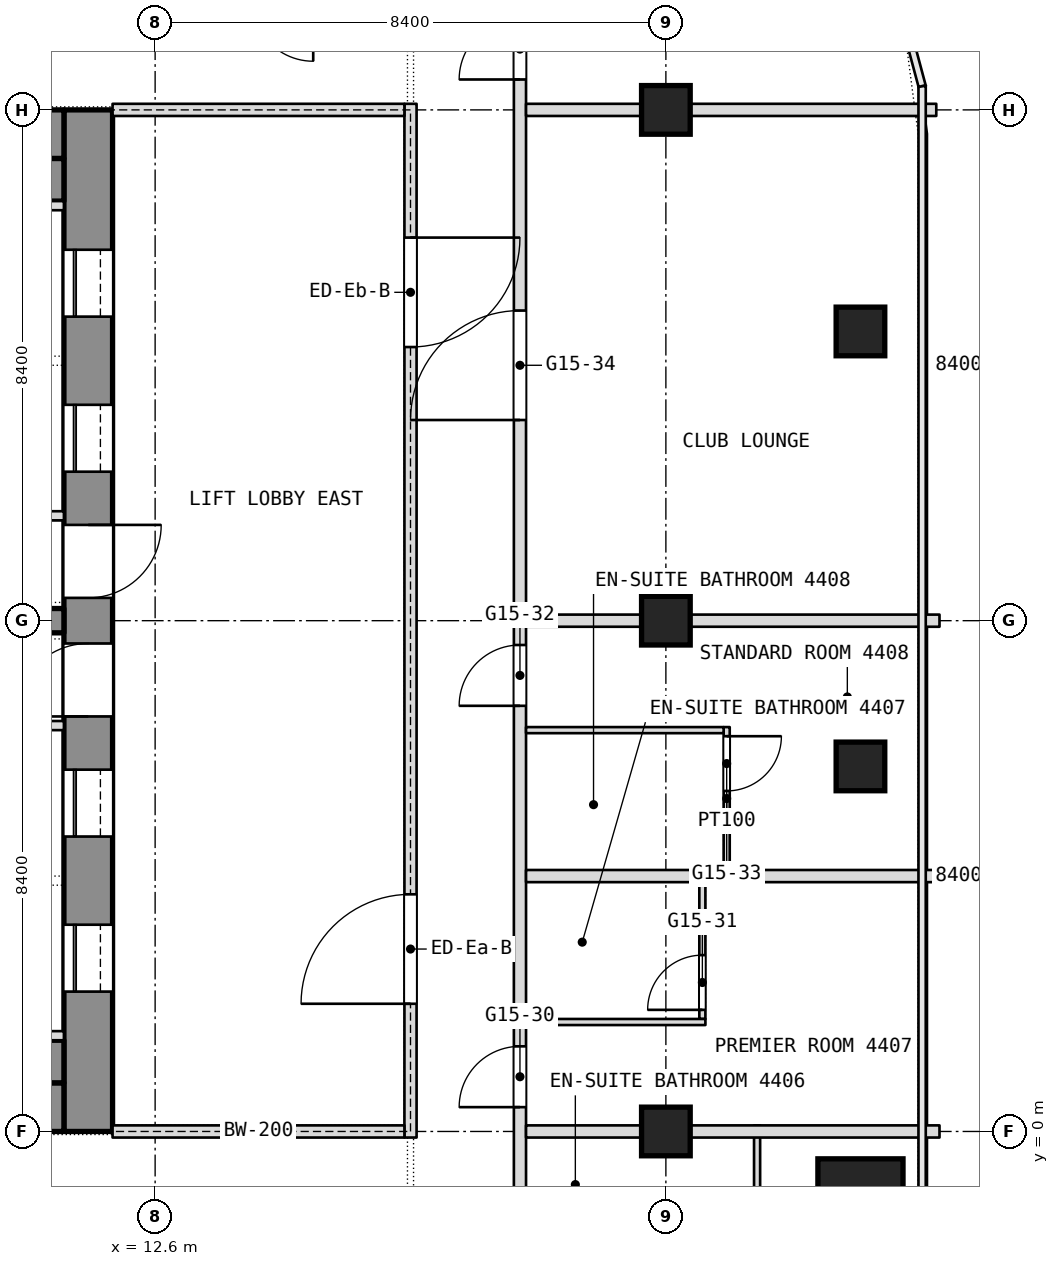
"""IFC4 building model, lengths in metres.
Left out: names, types, materials, properties, quantities, classifications, styles, units other than length and angle.
Written with IfcOpenShell. Run it as: python <this file> out.ifc"""

import sys

from ifc_helpers import new_model, si_unit, direction, frame, frame_2d, origin, origin_2d, place, context, subcontext, project, spatial, rectangle, extrude, element, fill, save


model = new_model("IFC4")
c1 = context("Model", 3, precision=1e-05, world=origin(), true_north=direction((0.0, 1.0)))
c2 = subcontext(c1, "Body", "Model", "MODEL_VIEW")
j1 = project(units=[si_unit("LENGTHUNIT", "METRE"), si_unit("PLANEANGLEUNIT", "RADIAN")], contexts=[c1])
p1 = place(None, origin())
s1 = spatial("IfcSite", under=j1, at=p1, CompositionType="ELEMENT")
p2 = place(p1, origin())
s2 = spatial("IfcBuilding", under=s1, at=p2, CompositionType="ELEMENT")
p3 = place(p2, frame((0.0, 0.0, 194.9)))
s3 = spatial("IfcBuildingStorey", under=s2, at=p3, CompositionType="ELEMENT", Elevation=194.9)
p4 = place(p3, frame((11.5, 0.0, 0.0), z_axis=(0.0, 0.0, 1.0), x_axis=(0.0, 1.0, 0.0)))
e1 = element("IfcWall", 1, at=p4, inside=s3, PredefinedType="SHEAR", context=c2, shape_type="SweptSolid", body=[
    extrude(rectangle(XDim=16.8, YDim=0.8, at=frame_2d((8.4, 0.0))), origin(), (0.0, 0.0, 1.0), 3.6),
])
p5 = place(p4, frame((2.3, 0.0, 0.0)))
e2 = element("IfcOpeningElement", 2, at=p5, cuts=e1, PredefinedType="OPENING", context=c2, shape_type="SweptSolid", body=[
    extrude(rectangle(XDim=1.1, YDim=2.1, at=frame_2d((0.55, 1.05))), frame((0.0, 0.4, 0.0), z_axis=(0.0, -1.0, 0.0), x_axis=(1.0, 0.0, 0.0)), (0.0, 0.0, 1.0), 0.8),
])
p6 = place(p4, frame((4.85, 0.0, 0.0)))
e3 = element("IfcOpeningElement", 3, at=p6, cuts=e1, PredefinedType="OPENING", context=c2, shape_type="SweptSolid", body=[
    extrude(rectangle(XDim=1.1, YDim=2.1, at=frame_2d((0.55, 1.05))), frame((0.0, 0.4, 0.0), z_axis=(0.0, -1.0, 0.0), x_axis=(1.0, 0.0, 0.0)), (0.0, 0.0, 1.0), 0.8),
])
p7 = place(p4, frame((6.825, 0.0, 0.0)))
e4 = element("IfcOpeningElement", 4, at=p7, cuts=e1, PredefinedType="OPENING", context=c2, shape_type="SweptSolid", body=[
    extrude(rectangle(XDim=1.2, YDim=2.1, at=frame_2d((0.6, 1.05))), frame((0.0, 0.4, 0.0), z_axis=(0.0, -1.0, 0.0), x_axis=(1.0, 0.0, 0.0)), (0.0, 0.0, 1.0), 0.8),
])
p8 = place(p4, frame((13.4, 0.0, 0.0)))
e5 = element("IfcOpeningElement", 5, at=p8, cuts=e1, PredefinedType="OPENING", context=c2, shape_type="SweptSolid", body=[
    extrude(rectangle(XDim=1.1, YDim=2.1, at=frame_2d((0.55, 1.05))), frame((0.0, 0.4, 0.0), z_axis=(0.0, -1.0, 0.0), x_axis=(1.0, 0.0, 0.0)), (0.0, 0.0, 1.0), 0.8),
])
p9 = place(p4, frame((10.85, 0.0, 0.0)))
e6 = element("IfcOpeningElement", 6, at=p9, cuts=e1, PredefinedType="OPENING", context=c2, shape_type="SweptSolid", body=[
    extrude(rectangle(XDim=1.1, YDim=2.1, at=frame_2d((0.55, 1.05))), frame((0.0, 0.4, 0.0), z_axis=(0.0, -1.0, 0.0), x_axis=(1.0, 0.0, 0.0)), (0.0, 0.0, 1.0), 0.8),
])
p10 = place(p4, frame((8.775, 0.0, 0.0)))
e7 = element("IfcOpeningElement", 7, at=p10, cuts=e1, PredefinedType="OPENING", context=c2, shape_type="SweptSolid", body=[
    extrude(rectangle(XDim=1.2, YDim=2.1, at=frame_2d((0.6, 1.05))), frame((0.0, 0.4, 0.0), z_axis=(0.0, -1.0, 0.0), x_axis=(1.0, 0.0, 0.0)), (0.0, 0.0, 1.0), 0.8),
])
for number, where, z_axis, x_axis in (
    (8, (-11.1, 0.4, 0.0), (0.0, 0.0, 1.0), (1.0, 0.0, 0.0)),
    (9, (-11.1, 16.4, 0.0), (0.0, 0.0, 1.0), (1.0, 0.0, 0.0)),
):
    element("IfcWall", number, at=place(p3, frame(where, z_axis=z_axis, x_axis=x_axis)), inside=s3, PredefinedType="SHEAR", context=c2, shape_type="SweptSolid", body=[
        extrude(rectangle(XDim=22.2, YDim=0.8, at=frame_2d((11.1, 0.0))), origin(), (0.0, 0.0, 1.0), 3.6),
    ])
p11 = place(p3, frame((4.4, 8.4, 0.0), z_axis=(0.0, 0.0, 1.0), x_axis=(1.0, 0.0, 0.0)))
e10 = element("IfcWall", 10, at=p11, inside=s3, PredefinedType="SHEAR", context=c2, shape_type="SweptSolid", body=[
    extrude(rectangle(XDim=6.7, YDim=0.4, at=frame_2d((3.35, 0.0))), origin(), (0.0, 0.0, 1.0), 3.6),
])
p12 = place(p3, frame((24.2, -1.15, 0.0), z_axis=(0.0, 0.0, 1.0), x_axis=(1.0, 0.0, 0.0)))
e11 = element("IfcColumn", 11, at=p12, inside=s3, PredefinedType="COLUMN", context=c2, shape_type="SweptSolid", body=[
    extrude(rectangle(XDim=1.4, YDim=1.4, at=origin_2d()), origin(), (0.0, 0.0, 1.0), 3.6),
])
for number, where, z_axis, x_axis in (
    (12, (21.0, 0.0, 0.0), (0.0, 0.0, 1.0), (1.0, 0.0, 0.0)),
    (13, (21.0, 8.4, 0.0), (0.0, 0.0, 1.0), (1.0, 0.0, 0.0)),
    (14, (21.0, 16.8, 0.0), (0.0, 0.0, 1.0), (1.0, 0.0, 0.0)),
    (15, (24.2, 13.156, 0.0), (0.0, 0.0, 1.0), (1.0, 0.0, 0.0)),
    (16, (24.2, 6.003, 0.0), (0.0, 0.0, 1.0), (1.0, 0.0, 0.0)),
):
    element("IfcColumn", number, at=place(p3, frame(where, z_axis=z_axis, x_axis=x_axis)), inside=s3, PredefinedType="COLUMN", context=c2, shape_type="SweptSolid", body=[
        extrude(rectangle(XDim=0.8, YDim=0.8, at=origin_2d()), origin(), (0.0, 0.0, 1.0), 3.6),
    ])
p13 = place(p3, frame((22.5, -2.35, 0.0), z_axis=(0.0, 0.0, 1.0), x_axis=(0.0, 1.0, 0.0)))
e17 = element("IfcWall", 17, at=p13, inside=s3, PredefinedType="PARTITIONING", context=c2, shape_type="SweptSolid", body=[
    extrude(rectangle(XDim=2.45, YDim=0.1, at=frame_2d((1.225, 0.0))), origin(), (0.0, 0.0, 1.0), 3.34),
])
p14 = place(p3, frame((22.0, 4.3, 0.0), z_axis=(0.0, 0.0, 1.0), x_axis=(0.0, 1.0, 0.0)))
e18 = element("IfcWall", 18, at=p14, inside=s3, PredefinedType="PARTITIONING", context=c2, shape_type="SweptSolid", body=[
    extrude(rectangle(XDim=2.35, YDim=0.1, at=frame_2d((1.175, 0.0))), origin(), (0.0, 0.0, 1.0), 3.34),
])
p15 = place(p14, frame((1.3, 0.0, 0.0)))
e19 = element("IfcOpeningElement", 19, at=p15, cuts=e18, PredefinedType="OPENING", context=c2, shape_type="SweptSolid", body=[
    extrude(rectangle(XDim=0.9, YDim=2.1, at=frame_2d((0.45, 1.05))), frame((0.0, 0.05, 0.0), z_axis=(0.0, -1.0, 0.0), x_axis=(1.0, 0.0, 0.0)), (0.0, 0.0, 1.0), 0.1),
])
p16 = place(p3, frame((21.6, 1.85, 0.0), z_axis=(0.0, 0.0, 1.0), x_axis=(0.0, 1.0, 0.0)))
e20 = element("IfcWall", 20, at=p16, inside=s3, PredefinedType="PARTITIONING", context=c2, shape_type="SweptSolid", body=[
    extrude(rectangle(XDim=2.45, YDim=0.1, at=frame_2d((1.225, 0.0))), origin(), (0.0, 0.0, 1.0), 3.34),
])
p17 = place(p16, frame((0.15, 0.0, 0.0)))
e21 = element("IfcOpeningElement", 21, at=p17, cuts=e20, PredefinedType="OPENING", context=c2, shape_type="SweptSolid", body=[
    extrude(rectangle(XDim=0.9, YDim=2.1, at=frame_2d((0.45, 1.05))), frame((0.0, 0.05, 0.0), z_axis=(0.0, -1.0, 0.0), x_axis=(1.0, 0.0, 0.0)), (0.0, 0.0, 1.0), 0.1),
])
p18 = place(p3, frame((18.6, -26.751, 0.0), z_axis=(0.0, 0.0, 1.0), x_axis=(0.0, 1.0, 0.0)))
e22 = element("IfcWall", 22, at=p18, inside=s3, PredefinedType="PARTITIONING", context=c2, shape_type="SweptSolid", body=[
    extrude(rectangle(XDim=49.091, YDim=0.2, at=frame_2d((24.545, 0.0))), origin(), (0.0, 0.0, 1.0), 3.34),
])
p19 = place(p18, frame((3.413, 0.0, 0.0)))
e23 = element("IfcOpeningElement", 23, at=p19, cuts=e22, PredefinedType="OPENING", context=c2, shape_type="SweptSolid", body=[
    extrude(rectangle(XDim=1.0, YDim=2.1, at=frame_2d((0.5, 1.05))), frame((0.0, 0.1, 0.0), z_axis=(0.0, -1.0, 0.0), x_axis=(1.0, 0.0, 0.0)), (0.0, 0.0, 1.0), 0.2),
])
p20 = place(p18, frame((5.838, 0.0, 0.0)))
e24 = element("IfcOpeningElement", 24, at=p20, cuts=e22, PredefinedType="OPENING", context=c2, shape_type="SweptSolid", body=[
    extrude(rectangle(XDim=1.0, YDim=2.1, at=frame_2d((0.5, 1.05))), frame((0.0, 0.1, 0.0), z_axis=(0.0, -1.0, 0.0), x_axis=(1.0, 0.0, 0.0)), (0.0, 0.0, 1.0), 0.2),
])
p21 = place(p18, frame((10.351, 0.0, 0.0)))
e25 = element("IfcOpeningElement", 25, at=p21, cuts=e22, PredefinedType="OPENING", context=c2, shape_type="SweptSolid", body=[
    extrude(rectangle(XDim=1.0, YDim=2.1, at=frame_2d((0.5, 1.05))), frame((0.0, 0.1, 0.0), z_axis=(0.0, -1.0, 0.0), x_axis=(1.0, 0.0, 0.0)), (0.0, 0.0, 1.0), 0.2),
])
p22 = place(p18, frame((16.951, 0.0, 0.0)))
e26 = element("IfcOpeningElement", 26, at=p22, cuts=e22, PredefinedType="OPENING", context=c2, shape_type="SweptSolid", body=[
    extrude(rectangle(XDim=1.0, YDim=2.1, at=frame_2d((0.5, 1.05))), frame((0.0, 0.1, 0.0), z_axis=(0.0, -1.0, 0.0), x_axis=(1.0, 0.0, 0.0)), (0.0, 0.0, 1.0), 0.2),
])
p23 = place(p18, frame((21.151, 0.0, 0.0)))
e27 = element("IfcOpeningElement", 27, at=p23, cuts=e22, PredefinedType="OPENING", context=c2, shape_type="SweptSolid", body=[
    extrude(rectangle(XDim=1.0, YDim=2.1, at=frame_2d((0.5, 1.05))), frame((0.0, 0.1, 0.0), z_axis=(0.0, -1.0, 0.0), x_axis=(1.0, 0.0, 0.0)), (0.0, 0.0, 1.0), 0.2),
])
p24 = place(p18, frame((22.951, 0.0, 0.0)))
e28 = element("IfcOpeningElement", 28, at=p24, cuts=e22, PredefinedType="OPENING", context=c2, shape_type="SweptSolid", body=[
    extrude(rectangle(XDim=1.0, YDim=2.1, at=frame_2d((0.5, 1.05))), frame((0.0, 0.1, 0.0), z_axis=(0.0, -1.0, 0.0), x_axis=(1.0, 0.0, 0.0)), (0.0, 0.0, 1.0), 0.2),
])
p25 = place(p18, frame((27.151, 0.0, 0.0)))
e29 = element("IfcOpeningElement", 29, at=p25, cuts=e22, PredefinedType="OPENING", context=c2, shape_type="SweptSolid", body=[
    extrude(rectangle(XDim=1.0, YDim=2.1, at=frame_2d((0.5, 1.05))), frame((0.0, 0.1, 0.0), z_axis=(0.0, -1.0, 0.0), x_axis=(1.0, 0.0, 0.0)), (0.0, 0.0, 1.0), 0.2),
])
p26 = place(p18, frame((33.751, 0.0, 0.0)))
e30 = element("IfcOpeningElement", 30, at=p26, cuts=e22, PredefinedType="OPENING", context=c2, shape_type="SweptSolid", body=[
    extrude(rectangle(XDim=1.0, YDim=2.1, at=frame_2d((0.5, 1.05))), frame((0.0, 0.1, 0.0), z_axis=(0.0, -1.0, 0.0), x_axis=(1.0, 0.0, 0.0)), (0.0, 0.0, 1.0), 0.2),
])
p27 = place(p18, frame((38.451, 0.0, 0.0)))
e31 = element("IfcOpeningElement", 31, at=p27, cuts=e22, PredefinedType="OPENING", context=c2, shape_type="SweptSolid", body=[
    extrude(rectangle(XDim=1.8, YDim=2.1, at=frame_2d((0.9, 1.05))), frame((0.0, 0.1, 0.0), z_axis=(0.0, -1.0, 0.0), x_axis=(1.0, 0.0, 0.0)), (0.0, 0.0, 1.0), 0.2),
])
p28 = place(p18, frame((44.051, 0.0, 0.0)))
e32 = element("IfcOpeningElement", 32, at=p28, cuts=e22, PredefinedType="OPENING", context=c2, shape_type="SweptSolid", body=[
    extrude(rectangle(XDim=1.0, YDim=2.1, at=frame_2d((0.5, 1.05))), frame((0.0, 0.1, 0.0), z_axis=(0.0, -1.0, 0.0), x_axis=(1.0, 0.0, 0.0)), (0.0, 0.0, 1.0), 0.2),
])
p29 = place(p3, frame((18.7, 0.0, 0.0), z_axis=(0.0, 0.0, 1.0), x_axis=(1.0, 0.0, 0.0)))
e33 = element("IfcWall", 33, at=p29, inside=s3, PredefinedType="PARTITIONING", context=c2, shape_type="SweptSolid", body=[
    extrude(rectangle(XDim=6.8, YDim=0.2, at=frame_2d((3.4, 0.0))), origin(), (0.0, 0.0, 1.0), 2.94),
])
p30 = place(p3, frame((18.7, 1.8, 0.0), z_axis=(0.0, 0.0, 1.0), x_axis=(1.0, 0.0, 0.0)))
e34 = element("IfcWall", 34, at=p30, inside=s3, PredefinedType="PARTITIONING", context=c2, shape_type="SweptSolid", body=[
    extrude(rectangle(XDim=2.95, YDim=0.1, at=frame_2d((1.475, 0.0))), origin(), (0.0, 0.0, 1.0), 3.34),
])
p31 = place(p3, frame((18.7, 4.2, 0.0), z_axis=(0.0, 0.0, 1.0), x_axis=(1.0, 0.0, 0.0)))
e35 = element("IfcWall", 35, at=p31, inside=s3, PredefinedType="PARTITIONING", context=c2, shape_type="SweptSolid", body=[
    extrude(rectangle(XDim=6.8, YDim=0.2, at=frame_2d((3.4, 0.0))), origin(), (0.0, 0.0, 1.0), 3.34),
])
p32 = place(p3, frame((18.7, 6.6, 0.0), z_axis=(0.0, 0.0, 1.0), x_axis=(1.0, 0.0, 0.0)))
e36 = element("IfcWall", 36, at=p32, inside=s3, PredefinedType="PARTITIONING", context=c2, shape_type="SweptSolid", body=[
    extrude(rectangle(XDim=3.25, YDim=0.1, at=frame_2d((1.625, 0.0))), origin(), (0.0, 0.0, 1.0), 3.34),
])
p33 = place(p3, frame((18.7, 8.4, 0.0), z_axis=(0.0, 0.0, 1.0), x_axis=(1.0, 0.0, 0.0)))
e37 = element("IfcWall", 37, at=p33, inside=s3, PredefinedType="PARTITIONING", context=c2, shape_type="SweptSolid", body=[
    extrude(rectangle(XDim=6.8, YDim=0.2, at=frame_2d((3.4, 0.0))), origin(), (0.0, 0.0, 1.0), 2.94),
])
p34 = place(p3, frame((18.7, 16.8, 0.0), z_axis=(0.0, 0.0, 1.0), x_axis=(1.0, 0.0, 0.0)))
e38 = element("IfcWall", 38, at=p34, inside=s3, PredefinedType="PARTITIONING", context=c2, shape_type="SweptSolid", body=[
    extrude(rectangle(XDim=6.747, YDim=0.2, at=frame_2d((3.374, 0.0))), origin(), (0.0, 0.0, 1.0), 2.94),
])
for number, where, z_axis, x_axis in (
    (39, (-11.1, 1.15, 0.0), (0.0, 0.0, 1.0), (1.0, 0.0, 0.0)),
    (40, (-11.1, 15.65, 0.0), (0.0, 0.0, 1.0), (1.0, 0.0, 0.0)),
):
    element("IfcWall", number, at=place(p3, frame(where, z_axis=z_axis, x_axis=x_axis)), inside=s3, PredefinedType="PARTITIONING", context=c2, shape_type="SweptSolid", body=[
        extrude(rectangle(XDim=22.2, YDim=0.7, at=frame_2d((11.1, 0.0))), origin(), (0.0, 0.0, 1.0), 3.34),
    ])
for number, where, z_axis, x_axis in (
    (41, (9.0, 6.675, 0.0), (0.0, 0.0, 1.0), (1.0, 0.0, 0.0)),
    (42, (9.0, 1.575, 0.0), (0.0, 0.0, 1.0), (1.0, 0.0, 0.0)),
    (43, (9.0, 10.125, 0.0), (0.0, 0.0, 1.0), (1.0, 0.0, 0.0)),
    (44, (9.0, 15.225, 0.0), (0.0, 0.0, 1.0), (1.0, 0.0, 0.0)),
):
    element("IfcWall", number, at=place(p3, frame(where, z_axis=z_axis, x_axis=x_axis)), inside=s3, PredefinedType="SHEAR", context=c2, shape_type="SweptSolid", body=[
        extrude(rectangle(XDim=2.1, YDim=0.15, at=frame_2d((1.05, 0.0))), origin(), (0.0, 0.0, 1.0), 3.6),
    ])
p35 = place(p3, frame((16.8, -0.1, 0.0), z_axis=(0.0, 0.0, 1.0), x_axis=(0.0, 1.0, 0.0)))
e45 = element("IfcWall", 45, at=p35, inside=s3, PredefinedType="PARTITIONING", context=c2, shape_type="SweptSolid", body=[
    extrude(rectangle(XDim=17.0, YDim=0.2, at=frame_2d((8.5, 0.0))), origin(), (0.0, 0.0, 1.0), 3.34),
])
p36 = place(p35, frame((2.2, 0.0, 0.0)))
e46 = element("IfcOpeningElement", 46, at=p36, cuts=e45, PredefinedType="OPENING", context=c2, shape_type="SweptSolid", body=[
    extrude(rectangle(XDim=1.8, YDim=2.1, at=frame_2d((0.9, 1.05))), frame((0.0, 0.1, 0.0), z_axis=(0.0, -1.0, 0.0), x_axis=(1.0, 0.0, 0.0)), (0.0, 0.0, 1.0), 0.2),
])
p37 = place(p35, frame((13.0, 0.0, 0.0)))
e47 = element("IfcOpeningElement", 47, at=p37, cuts=e45, PredefinedType="OPENING", context=c2, shape_type="SweptSolid", body=[
    extrude(rectangle(XDim=1.8, YDim=2.1, at=frame_2d((0.9, 1.05))), frame((0.0, 0.1, 0.0), z_axis=(0.0, -1.0, 0.0), x_axis=(1.0, 0.0, 0.0)), (0.0, 0.0, 1.0), 0.2),
])
for number, where, z_axis, x_axis in (
    (48, (11.9, 0.0, 0.0), (0.0, 0.0, 1.0), (1.0, 0.0, 0.0)),
    (49, (11.9, 16.8, 0.0), (0.0, 0.0, 1.0), (1.0, 0.0, 0.0)),
):
    element("IfcWall", number, at=place(p3, frame(where, z_axis=z_axis, x_axis=x_axis)), inside=s3, PredefinedType="PARTITIONING", context=c2, shape_type="SweptSolid", body=[
        extrude(rectangle(XDim=4.8, YDim=0.2, at=frame_2d((2.4, 0.0))), origin(), (0.0, 0.0, 1.0), 2.94),
    ])
p38 = place(p15, origin())
e50 = element("IfcDoor", 50, at=p38, inside=s3, OperationType="SINGLE_SWING_RIGHT", PredefinedType="DOOR", context=c2, shape_type="SweptSolid", body=[
    extrude(rectangle(XDim=0.9, YDim=2.1, at=frame_2d((0.45, 1.05))), frame((0.0, 0.025, 0.0), z_axis=(0.0, -1.0, 0.0), x_axis=(1.0, 0.0, 0.0)), (0.0, 0.0, 1.0), 0.05),
])
fill(e19, e50)
p39 = place(p17, origin())
e51 = element("IfcDoor", 51, at=p39, inside=s3, OperationType="SINGLE_SWING_LEFT", PredefinedType="DOOR", context=c2, shape_type="SweptSolid", body=[
    extrude(rectangle(XDim=0.9, YDim=2.1, at=frame_2d((0.45, 1.05))), frame((0.0, 0.025, 0.0), z_axis=(0.0, -1.0, 0.0), x_axis=(1.0, 0.0, 0.0)), (0.0, 0.0, 1.0), 0.05),
])
fill(e21, e51)
p40 = place(p25, origin())
e52 = element("IfcDoor", 52, at=p40, inside=s3, OperationType="SINGLE_SWING_RIGHT", PredefinedType="DOOR", context=c2, shape_type="SweptSolid", body=[
    extrude(rectangle(XDim=1.0, YDim=2.1, at=frame_2d((0.5, 1.05))), frame((0.0, 0.025, 0.0), z_axis=(0.0, -1.0, 0.0), x_axis=(1.0, 0.0, 0.0)), (0.0, 0.0, 1.0), 0.05),
])
fill(e29, e52)
p41 = place(p26, origin())
e53 = element("IfcDoor", 53, at=p41, inside=s3, OperationType="SINGLE_SWING_RIGHT", PredefinedType="DOOR", context=c2, shape_type="SweptSolid", body=[
    extrude(rectangle(XDim=1.0, YDim=2.1, at=frame_2d((0.5, 1.05))), frame((0.0, 0.025, 0.0), z_axis=(0.0, -1.0, 0.0), x_axis=(1.0, 0.0, 0.0)), (0.0, 0.0, 1.0), 0.05),
])
fill(e30, e53)
p42 = place(p27, origin())
e54 = element("IfcDoor", 54, at=p42, inside=s3, OperationType="DOUBLE_DOOR_SINGLE_SWING", PredefinedType="DOOR", context=c2, shape_type="SweptSolid", body=[
    extrude(rectangle(XDim=1.8, YDim=2.1, at=frame_2d((0.9, 1.05))), frame((0.0, 0.025, 0.0), z_axis=(0.0, -1.0, 0.0), x_axis=(1.0, 0.0, 0.0)), (0.0, 0.0, 1.0), 0.05),
])
fill(e31, e54)
p43 = place(p28, origin())
e55 = element("IfcDoor", 55, at=p43, inside=s3, OperationType="SINGLE_SWING_LEFT", PredefinedType="DOOR", context=c2, shape_type="SweptSolid", body=[
    extrude(rectangle(XDim=1.0, YDim=2.1, at=frame_2d((0.5, 1.05))), frame((0.0, 0.025, 0.0), z_axis=(0.0, -1.0, 0.0), x_axis=(1.0, 0.0, 0.0)), (0.0, 0.0, 1.0), 0.05),
])
fill(e32, e55)
p44 = place(p5, origin())
e56 = element("IfcDoor", 56, at=p44, inside=s3, OperationType="SLIDING_TO_LEFT", PredefinedType="DOOR", context=c2, shape_type="SweptSolid", body=[
    extrude(rectangle(XDim=1.1, YDim=2.1, at=frame_2d((0.55, 1.05))), frame((0.0, 0.025, 0.0), z_axis=(0.0, -1.0, 0.0), x_axis=(1.0, 0.0, 0.0)), (0.0, 0.0, 1.0), 0.05),
])
fill(e2, e56)
p45 = place(p6, origin())
e57 = element("IfcDoor", 57, at=p45, inside=s3, OperationType="SLIDING_TO_LEFT", PredefinedType="DOOR", context=c2, shape_type="SweptSolid", body=[
    extrude(rectangle(XDim=1.1, YDim=2.1, at=frame_2d((0.55, 1.05))), frame((0.0, 0.025, 0.0), z_axis=(0.0, -1.0, 0.0), x_axis=(1.0, 0.0, 0.0)), (0.0, 0.0, 1.0), 0.05),
])
fill(e3, e57)
p46 = place(p7, origin())
e58 = element("IfcDoor", 58, at=p46, inside=s3, OperationType="SINGLE_SWING_LEFT", PredefinedType="DOOR", context=c2, shape_type="SweptSolid", body=[
    extrude(rectangle(XDim=1.2, YDim=2.1, at=frame_2d((0.6, 1.05))), frame((0.0, 0.025, 0.0), z_axis=(0.0, -1.0, 0.0), x_axis=(1.0, 0.0, 0.0)), (0.0, 0.0, 1.0), 0.05),
])
fill(e4, e58)
p47 = place(p8, origin())
e59 = element("IfcDoor", 59, at=p47, inside=s3, OperationType="SLIDING_TO_LEFT", PredefinedType="DOOR", context=c2, shape_type="SweptSolid", body=[
    extrude(rectangle(XDim=1.1, YDim=2.1, at=frame_2d((0.55, 1.05))), frame((0.0, 0.025, 0.0), z_axis=(0.0, -1.0, 0.0), x_axis=(1.0, 0.0, 0.0)), (0.0, 0.0, 1.0), 0.05),
])
fill(e5, e59)
p48 = place(p9, origin())
e60 = element("IfcDoor", 60, at=p48, inside=s3, OperationType="SLIDING_TO_LEFT", PredefinedType="DOOR", context=c2, shape_type="SweptSolid", body=[
    extrude(rectangle(XDim=1.1, YDim=2.1, at=frame_2d((0.55, 1.05))), frame((0.0, 0.025, 0.0), z_axis=(0.0, -1.0, 0.0), x_axis=(1.0, 0.0, 0.0)), (0.0, 0.0, 1.0), 0.05),
])
fill(e6, e60)
p49 = place(p10, origin())
e61 = element("IfcDoor", 61, at=p49, inside=s3, OperationType="SINGLE_SWING_LEFT", PredefinedType="DOOR", context=c2, shape_type="SweptSolid", body=[
    extrude(rectangle(XDim=1.2, YDim=2.1, at=frame_2d((0.6, 1.05))), frame((0.0, 0.025, 0.0), z_axis=(0.0, -1.0, 0.0), x_axis=(1.0, 0.0, 0.0)), (0.0, 0.0, 1.0), 0.05),
])
fill(e7, e61)
p50 = place(p36, origin())
e62 = element("IfcDoor", 62, at=p50, inside=s3, OperationType="DOUBLE_DOOR_SINGLE_SWING", PredefinedType="DOOR", context=c2, shape_type="SweptSolid", body=[
    extrude(rectangle(XDim=1.8, YDim=2.1, at=frame_2d((0.9, 1.05))), frame((0.0, 0.025, 0.0), z_axis=(0.0, -1.0, 0.0), x_axis=(1.0, 0.0, 0.0)), (0.0, 0.0, 1.0), 0.05),
])
fill(e46, e62)
p51 = place(p37, origin())
e63 = element("IfcDoor", 63, at=p51, inside=s3, OperationType="DOUBLE_DOOR_SINGLE_SWING", PredefinedType="DOOR", context=c2, shape_type="SweptSolid", body=[
    extrude(rectangle(XDim=1.8, YDim=2.1, at=frame_2d((0.9, 1.05))), frame((0.0, 0.025, 0.0), z_axis=(0.0, -1.0, 0.0), x_axis=(1.0, 0.0, 0.0)), (0.0, 0.0, 1.0), 0.05),
])
fill(e47, e63)
save(model, sys.argv[1])
